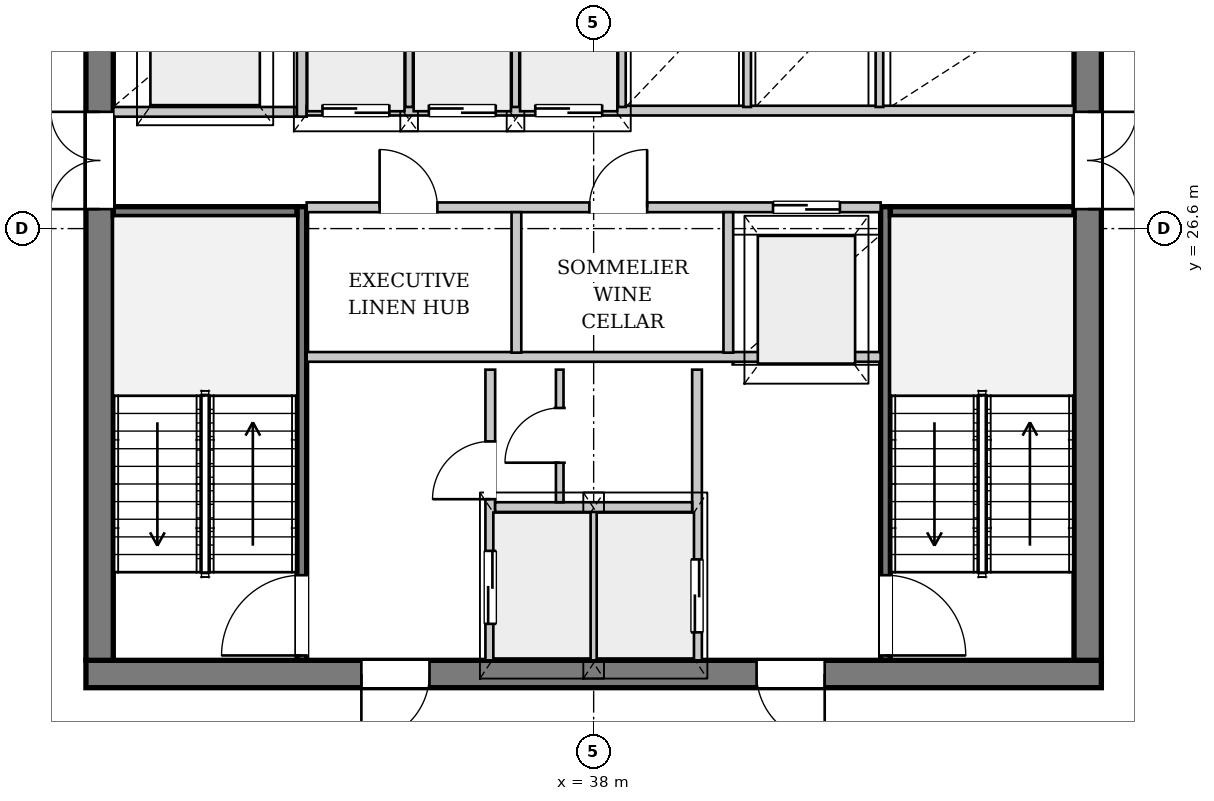
"""IFC4 building model, lengths in metres.
Left out: names, types, materials, properties, quantities, classifications, styles, units other than length and angle.
Written with IfcOpenShell. Run it as: python <this file> out.ifc"""

import sys

from ifc_helpers import new_model, si_unit, direction, frame, frame_2d, origin, place, context, subcontext, project, spatial, rectangle, extrude, source, transform, mapped, element, fill, save


model = new_model("IFC4")
c1 = context("Model", 3, precision=1e-05, world=origin(), true_north=direction((0.0, 1.0)))
c2 = subcontext(c1, "Body", "Model", "MODEL_VIEW")
j1 = project(units=[si_unit("LENGTHUNIT", "METRE"), si_unit("PLANEANGLEUNIT", "RADIAN")], contexts=[c1])
p1 = place(None, origin())
s1 = spatial("IfcSite", under=j1, at=p1, CompositionType="ELEMENT")
p2 = place(p1, origin())
s2 = spatial("IfcBuilding", under=s1, at=p2, CompositionType="ELEMENT")
p3 = place(p2, frame((0.0, 0.0, 209.6)))
s3 = spatial("IfcBuildingStorey", under=s2, at=p3, CompositionType="ELEMENT", Elevation=209.6)
p4 = place(p3, frame((52.953, 23.164, 0.0), z_axis=(0.0, 0.0, 1.0), x_axis=(-0.498307707731, -0.867000247068, 0.0)))
e1 = element("IfcWall", 1, at=p4, inside=s3, PredefinedType="SOLIDWALL", context=c2, shape_type="SweptSolid", body=[
    extrude(rectangle(XDim=23.102, YDim=0.32, at=frame_2d((11.551, 0.0))), origin(), (0.0, 0.0, 1.0), 2.822),
])
p5 = place(p4, frame((6.643, 0.0, 0.0)))
e2 = element("IfcOpeningElement", 2, at=p5, cuts=e1, PredefinedType="OPENING", context=c2, shape_type="SweptSolid", body=[
    extrude(rectangle(XDim=1.5, YDim=2.3, at=frame_2d((0.75, 1.15))), frame((0.0, 0.17, 0.0), z_axis=(0.0, -1.0, 0.0), x_axis=(1.0, 0.0, 0.0)), (0.0, 0.0, 1.0), 0.34),
])
p6 = place(p4, frame((15.796, 0.0, 0.352)))
e3 = element("IfcOpeningElement", 3, at=p6, cuts=e1, PredefinedType="OPENING", context=c2, shape_type="SweptSolid", body=[
    extrude(rectangle(XDim=2.6, YDim=2.35, at=frame_2d((1.3, 1.175))), frame((0.0, 0.17, 0.0), z_axis=(0.0, -1.0, 0.0), x_axis=(1.0, 0.0, 0.0)), (0.0, 0.0, 1.0), 0.34),
])
p7 = place(p3, frame((46.35, 19.275, 0.0), z_axis=(0.0, 0.0, 1.0), x_axis=(-1.0, 0.0, 0.0)))
e4 = element("IfcWall", 4, at=p7, inside=s3, PredefinedType="SHEAR", context=c2, shape_type="SweptSolid", body=[
    extrude(rectangle(XDim=16.7, YDim=0.45, at=frame_2d((8.35, 0.0))), origin(), (0.0, 0.0, 1.0), 3.33),
])
p8 = place(p7, frame((4.55, 0.0, 0.0)))
e5 = element("IfcOpeningElement", 5, at=p8, cuts=e4, PredefinedType="OPENING", context=c2, shape_type="SweptSolid", body=[
    extrude(rectangle(XDim=1.12, YDim=2.25, at=frame_2d((0.56, 1.125))), frame((0.0, 0.235, 0.0), z_axis=(0.0, -1.0, 0.0), x_axis=(1.0, 0.0, 0.0)), (0.0, 0.0, 1.0), 0.47),
])
p9 = place(p7, frame((11.05, 0.0, 0.0)))
e6 = element("IfcOpeningElement", 6, at=p9, cuts=e4, PredefinedType="OPENING", context=c2, shape_type="SweptSolid", body=[
    extrude(rectangle(XDim=1.12, YDim=2.25, at=frame_2d((0.56, 1.125))), frame((0.0, 0.235, 0.0), z_axis=(0.0, -1.0, 0.0), x_axis=(1.0, 0.0, 0.0)), (0.0, 0.0, 1.0), 0.47),
])
p10 = place(p3, frame((29.875, 19.5, 0.0), z_axis=(0.0, 0.0, 1.0), x_axis=(0.0, 1.0, 0.0)))
e7 = element("IfcWall", 7, at=p10, inside=s3, PredefinedType="SHEAR", context=c2, shape_type="SweptSolid", body=[
    extrude(rectangle(XDim=14.2, YDim=0.45, at=frame_2d((7.1, 0.0))), origin(), (0.0, 0.0, 1.0), 3.33),
])
p11 = place(p10, frame((7.42, 0.0, 0.0)))
e8 = element("IfcOpeningElement", 8, at=p11, cuts=e7, PredefinedType="OPENING", context=c2, shape_type="SweptSolid", body=[
    extrude(rectangle(XDim=1.6, YDim=2.2, at=frame_2d((0.8, 1.1))), frame((0.0, 0.235, 0.0), z_axis=(0.0, -1.0, 0.0), x_axis=(1.0, 0.0, 0.0)), (0.0, 0.0, 1.0), 0.47),
])
p12 = place(p3, frame((46.125, 33.7, 0.0), z_axis=(0.0, 0.0, 1.0), x_axis=(0.0, -1.0, 0.0)))
e9 = element("IfcWall", 9, at=p12, inside=s3, PredefinedType="SHEAR", context=c2, shape_type="SweptSolid", body=[
    extrude(rectangle(XDim=14.2, YDim=0.45, at=frame_2d((7.1, 0.0))), origin(), (0.0, 0.0, 1.0), 3.33),
])
p13 = place(p12, frame((5.18, 0.0, 0.0)))
e10 = element("IfcOpeningElement", 10, at=p13, cuts=e9, PredefinedType="OPENING", context=c2, shape_type="SweptSolid", body=[
    extrude(rectangle(XDim=1.6, YDim=2.2, at=frame_2d((0.8, 1.1))), frame((0.0, 0.235, 0.0), z_axis=(0.0, -1.0, 0.0), x_axis=(1.0, 0.0, 0.0)), (0.0, 0.0, 1.0), 0.47),
])
p14 = place(p12, frame((2.05, 0.0, 0.0)))
e11 = element("IfcOpeningElement", 11, at=p14, cuts=e9, PredefinedType="OPENING", context=c2, shape_type="SweptSolid", body=[
    extrude(rectangle(XDim=0.95, YDim=2.1, at=frame_2d((0.475, 1.05))), frame((0.0, 0.235, 0.0), z_axis=(0.0, -1.0, 0.0), x_axis=(1.0, 0.0, 0.0)), (0.0, 0.0, 1.0), 0.47),
])
p15 = place(p3, frame((33.2, 19.5, 0.0), z_axis=(0.0, 0.0, 1.0), x_axis=(0.0, 1.0, 0.0)))
e12 = element("IfcWall", 12, at=p15, inside=s3, PredefinedType="PARTITIONING", context=c2, shape_type="SweptSolid", body=[
    extrude(rectangle(XDim=7.46, YDim=0.16, at=frame_2d((3.73, 0.0))), origin(), (0.0, 0.0, 1.0), 3.33),
])
p16 = place(p15, frame((0.08, 0.0, 0.0)))
e13 = element("IfcOpeningElement", 13, at=p16, cuts=e12, PredefinedType="OPENING", context=c2, shape_type="SweptSolid", body=[
    extrude(rectangle(XDim=1.32, YDim=2.2, at=frame_2d((0.66, 1.1))), frame((0.0, 0.09, 0.0), z_axis=(0.0, -1.0, 0.0), x_axis=(1.0, 0.0, 0.0)), (0.0, 0.0, 1.0), 0.18),
])
p17 = place(p3, frame((30.1, 26.88, 0.0), z_axis=(0.0, 0.0, 1.0), x_axis=(1.0, 0.0, 0.0)))
e14 = element("IfcWall", 14, at=p17, inside=s3, PredefinedType="PARTITIONING", context=c2, shape_type="SweptSolid", body=[
    extrude(rectangle(XDim=3.02, YDim=0.16, at=frame_2d((1.51, 0.0))), origin(), (0.0, 0.0, 1.0), 3.33),
])
p18 = place(p3, frame((42.8, 26.96, 0.0), z_axis=(0.0, 0.0, 1.0), x_axis=(0.0, -1.0, 0.0)))
e15 = element("IfcWall", 15, at=p18, inside=s3, PredefinedType="PARTITIONING", context=c2, shape_type="SweptSolid", body=[
    extrude(rectangle(XDim=7.46, YDim=0.16, at=frame_2d((3.73, 0.0))), origin(), (0.0, 0.0, 1.0), 3.33),
])
p19 = place(p18, frame((6.06, 0.0, 0.0)))
e16 = element("IfcOpeningElement", 16, at=p19, cuts=e15, PredefinedType="OPENING", context=c2, shape_type="SweptSolid", body=[
    extrude(rectangle(XDim=1.32, YDim=2.2, at=frame_2d((0.66, 1.1))), frame((0.0, 0.09, 0.0), z_axis=(0.0, -1.0, 0.0), x_axis=(1.0, 0.0, 0.0)), (0.0, 0.0, 1.0), 0.18),
])
p20 = place(p3, frame((42.88, 26.88, 0.0), z_axis=(0.0, 0.0, 1.0), x_axis=(1.0, 0.0, 0.0)))
e17 = element("IfcWall", 17, at=p20, inside=s3, PredefinedType="PARTITIONING", context=c2, shape_type="SweptSolid", body=[
    extrude(rectangle(XDim=3.02, YDim=0.16, at=frame_2d((1.51, 0.0))), origin(), (0.0, 0.0, 1.0), 3.33),
])
p21 = place(p3, frame((36.3, 19.5, 0.0), z_axis=(0.0, 0.0, 1.0), x_axis=(0.0, 1.0, 0.0)))
e18 = element("IfcWall", 18, at=p21, inside=s3, PredefinedType="PARTITIONING", context=c2, shape_type="SweptSolid", body=[
    extrude(rectangle(XDim=4.78, YDim=0.16, at=frame_2d((2.39, 0.0))), origin(), (0.0, 0.0, 1.0), 3.33),
])
p22 = place(p21, frame((0.6, 0.0, 0.0)))
e19 = element("IfcOpeningElement", 19, at=p22, cuts=e18, PredefinedType="OPENING", context=c2, shape_type="SweptSolid", body=[
    extrude(rectangle(XDim=1.2, YDim=2.2, at=frame_2d((0.6, 1.1))), frame((0.0, 0.09, 0.0), z_axis=(0.0, -1.0, 0.0), x_axis=(1.0, 0.0, 0.0)), (0.0, 0.0, 1.0), 0.18),
])
p23 = place(p21, frame((2.65, 0.0, 0.0)))
e20 = element("IfcOpeningElement", 20, at=p23, cuts=e18, PredefinedType="OPENING", context=c2, shape_type="SweptSolid", body=[
    extrude(rectangle(XDim=0.95, YDim=2.1, at=frame_2d((0.475, 1.05))), frame((0.0, 0.09, 0.0), z_axis=(0.0, -1.0, 0.0), x_axis=(1.0, 0.0, 0.0)), (0.0, 0.0, 1.0), 0.18),
])
p24 = place(p3, frame((39.7, 24.28, 0.0), z_axis=(0.0, 0.0, 1.0), x_axis=(0.0, -1.0, 0.0)))
e21 = element("IfcWall", 21, at=p24, inside=s3, PredefinedType="PARTITIONING", context=c2, shape_type="SweptSolid", body=[
    extrude(rectangle(XDim=4.78, YDim=0.16, at=frame_2d((2.39, 0.0))), origin(), (0.0, 0.0, 1.0), 3.33),
])
p25 = place(p24, frame((3.12, 0.0, 0.0)))
e22 = element("IfcOpeningElement", 22, at=p25, cuts=e21, PredefinedType="OPENING", context=c2, shape_type="SweptSolid", body=[
    extrude(rectangle(XDim=1.2, YDim=2.2, at=frame_2d((0.6, 1.1))), frame((0.0, 0.09, 0.0), z_axis=(0.0, -1.0, 0.0), x_axis=(1.0, 0.0, 0.0)), (0.0, 0.0, 1.0), 0.18),
])
p26 = place(p3, frame((38.0, 19.5, 0.0), z_axis=(0.0, 0.0, 1.0), x_axis=(0.0, 1.0, 0.0)))
e23 = element("IfcWall", 23, at=p26, inside=s3, PredefinedType="PARTITIONING", context=c2, shape_type="SweptSolid", body=[
    extrude(rectangle(XDim=2.46, YDim=0.125, at=frame_2d((1.23, 0.0))), origin(), (0.0, 0.0, 1.0), 3.33),
])
p27 = place(p3, frame((36.38, 22.02, 0.0), z_axis=(0.0, 0.0, 1.0), x_axis=(1.0, 0.0, 0.0)))
e24 = element("IfcWall", 24, at=p27, inside=s3, PredefinedType="PARTITIONING", context=c2, shape_type="SweptSolid", body=[
    extrude(rectangle(XDim=3.24, YDim=0.16, at=frame_2d((1.62, 0.0))), origin(), (0.0, 0.0, 1.0), 3.33),
])
p28 = place(p3, frame((33.28, 24.49, 0.0), z_axis=(0.0, 0.0, 1.0), x_axis=(1.0, 0.0, 0.0)))
e25 = element("IfcWall", 25, at=p28, inside=s3, PredefinedType="PARTITIONING", context=c2, shape_type="SweptSolid", body=[
    extrude(rectangle(XDim=9.44, YDim=0.16, at=frame_2d((4.72, 0.0))), origin(), (0.0, 0.0, 1.0), 3.33),
])
p29 = place(p3, frame((37.442, 22.1, 0.0), z_axis=(0.0, 0.0, 1.0), x_axis=(0.0, 1.0, 0.0)))
e26 = element("IfcWall", 26, at=p29, inside=s3, PredefinedType="PARTITIONING", context=c2, shape_type="SweptSolid", body=[
    extrude(rectangle(XDim=2.18, YDim=0.125, at=frame_2d((1.09, 0.0))), origin(), (0.0, 0.0, 1.0), 3.33),
])
p30 = place(p29, frame((0.65, 0.0, 0.0)))
e27 = element("IfcOpeningElement", 27, at=p30, cuts=e26, PredefinedType="OPENING", context=c2, shape_type="SweptSolid", body=[
    extrude(rectangle(XDim=0.9, YDim=2.1, at=frame_2d((0.45, 1.05))), frame((0.0, 0.073, 0.0), z_axis=(0.0, -1.0, 0.0), x_axis=(1.0, 0.0, 0.0)), (0.0, 0.0, 1.0), 0.145),
])
p31 = place(p3, frame((30.1, 28.52, 0.0), z_axis=(0.0, 0.0, 1.0), x_axis=(1.0, 0.0, 0.0)))
e28 = element("IfcWall", 28, at=p31, inside=s3, PredefinedType="PARTITIONING", context=c2, shape_type="SweptSolid", body=[
    extrude(rectangle(XDim=3.02, YDim=0.16, at=frame_2d((1.51, 0.0))), origin(), (0.0, 0.0, 1.0), 3.33),
])
p32 = place(p3, frame((33.2, 28.44, 0.0), z_axis=(0.0, 0.0, 1.0), x_axis=(0.0, 1.0, 0.0)))
e29 = element("IfcWall", 29, at=p32, inside=s3, PredefinedType="PARTITIONING", context=c2, shape_type="SweptSolid", body=[
    extrude(rectangle(XDim=5.26, YDim=0.16, at=frame_2d((2.63, 0.0))), origin(), (0.0, 0.0, 1.0), 3.33),
])
p33 = place(p3, frame((33.28, 26.95, 0.0), z_axis=(0.0, 0.0, 1.0), x_axis=(1.0, 0.0, 0.0)))
e30 = element("IfcWall", 30, at=p33, inside=s3, PredefinedType="PARTITIONING", context=c2, shape_type="SweptSolid", body=[
    extrude(rectangle(XDim=9.44, YDim=0.16, at=frame_2d((4.72, 0.0))), origin(), (0.0, 0.0, 1.0), 3.33),
])
p34 = place(p33, frame((1.2, 0.0, 0.0)))
e31 = element("IfcOpeningElement", 31, at=p34, cuts=e30, PredefinedType="OPENING", context=c2, shape_type="SweptSolid", body=[
    extrude(rectangle(XDim=0.95, YDim=2.1, at=frame_2d((0.475, 1.05))), frame((0.0, 0.09, 0.0), z_axis=(0.0, -1.0, 0.0), x_axis=(1.0, 0.0, 0.0)), (0.0, 0.0, 1.0), 0.18),
])
p35 = place(p33, frame((4.65, 0.0, 0.0)))
e32 = element("IfcOpeningElement", 32, at=p35, cuts=e30, PredefinedType="OPENING", context=c2, shape_type="SweptSolid", body=[
    extrude(rectangle(XDim=0.95, YDim=2.1, at=frame_2d((0.475, 1.05))), frame((0.0, 0.09, 0.0), z_axis=(0.0, -1.0, 0.0), x_axis=(1.0, 0.0, 0.0)), (0.0, 0.0, 1.0), 0.18),
])
p36 = place(p33, frame((7.67, 0.0, 0.0)))
e33 = element("IfcOpeningElement", 33, at=p36, cuts=e30, PredefinedType="OPENING", context=c2, shape_type="SweptSolid", body=[
    extrude(rectangle(XDim=1.1, YDim=2.2, at=frame_2d((0.55, 1.1))), frame((0.0, 0.09, 0.0), z_axis=(0.0, -1.0, 0.0), x_axis=(1.0, 0.0, 0.0)), (0.0, 0.0, 1.0), 0.18),
])
for number, where, z_axis, x_axis in (
    (34, (36.73, 24.56, 0.0), (0.0, 0.0, 1.0), (0.0, 1.0, 0.0)),
    (35, (40.215, 24.56, 0.0), (0.0, 0.0, 1.0), (0.0, 1.0, 0.0)),
):
    element("IfcWall", number, at=place(p3, frame(where, z_axis=z_axis, x_axis=x_axis)), inside=s3, PredefinedType="PARTITIONING", context=c2, shape_type="SweptSolid", body=[
        extrude(rectangle(XDim=2.31, YDim=0.16, at=frame_2d((1.155, 0.0))), origin(), (0.0, 0.0, 1.0), 3.33),
    ])
p37 = place(p3, frame((33.28, 28.54, 0.0), z_axis=(0.0, 0.0, 1.0), x_axis=(1.0, 0.0, 0.0)))
e36 = element("IfcWall", 36, at=p37, inside=s3, PredefinedType="PARTITIONING", context=c2, shape_type="SweptSolid", body=[
    extrude(rectangle(XDim=12.62, YDim=0.16, at=frame_2d((6.31, 0.0))), origin(), (0.0, 0.0, 1.0), 3.33),
])
p38 = place(p37, frame((0.26, 0.0, 0.0)))
e37 = element("IfcOpeningElement", 37, at=p38, cuts=e36, PredefinedType="OPENING", context=c2, shape_type="SweptSolid", body=[
    extrude(rectangle(XDim=1.1, YDim=2.2, at=frame_2d((0.55, 1.1))), frame((0.0, 0.09, 0.0), z_axis=(0.0, -1.0, 0.0), x_axis=(1.0, 0.0, 0.0)), (0.0, 0.0, 1.0), 0.18),
])
p39 = place(p37, frame((2.01, 0.0, 0.0)))
e38 = element("IfcOpeningElement", 38, at=p39, cuts=e36, PredefinedType="OPENING", context=c2, shape_type="SweptSolid", body=[
    extrude(rectangle(XDim=1.1, YDim=2.2, at=frame_2d((0.55, 1.1))), frame((0.0, 0.09, 0.0), z_axis=(0.0, -1.0, 0.0), x_axis=(1.0, 0.0, 0.0)), (0.0, 0.0, 1.0), 0.18),
])
p40 = place(p37, frame((3.76, 0.0, 0.0)))
e39 = element("IfcOpeningElement", 39, at=p40, cuts=e36, PredefinedType="OPENING", context=c2, shape_type="SweptSolid", body=[
    extrude(rectangle(XDim=1.1, YDim=2.2, at=frame_2d((0.55, 1.1))), frame((0.0, 0.09, 0.0), z_axis=(0.0, -1.0, 0.0), x_axis=(1.0, 0.0, 0.0)), (0.0, 0.0, 1.0), 0.18),
])
for number, where, z_axis, x_axis in (
    (40, (34.965, 28.6, 0.0), (0.0, 0.0, 1.0), (0.0, 1.0, 0.0)),
    (41, (36.715, 28.6, 0.0), (0.0, 0.0, 1.0), (0.0, 1.0, 0.0)),
    (42, (38.465, 28.6, 0.0), (0.0, 0.0, 1.0), (0.0, 1.0, 0.0)),
    (43, (40.525, 28.6, 0.0), (0.0, 0.0, 1.0), (0.0, 1.0, 0.0)),
    (44, (42.7, 28.6, 0.0), (0.0, 0.0, 1.0), (0.0, 1.0, 0.0)),
):
    element("IfcWall", number, at=place(p3, frame(where, z_axis=z_axis, x_axis=x_axis)), inside=s3, PredefinedType="PARTITIONING", context=c2, shape_type="SweptSolid", body=[
        extrude(rectangle(XDim=1.92, YDim=0.125, at=frame_2d((0.96, 0.0))), origin(), (0.0, 0.0, 1.0), 3.33),
    ])
m1 = source(origin(), c2, "Body", "SweptSolid", [
    extrude(rectangle(XDim=1.12, YDim=2.25, at=frame_2d((0.56, 1.125))), frame((0.0, 0.025, 0.0), z_axis=(0.0, -1.0, 0.0), x_axis=(1.0, 0.0, 0.0)), (0.0, 0.0, 1.0), 0.05),
])
p41 = place(p8, origin())
e45 = element("IfcDoor", 45, at=p41, inside=s3, OperationType="SINGLE_SWING_LEFT", PredefinedType="DOOR", context=c2, shape_type="MappedRepresentation", body=[
    mapped(m1, transform((0.0, 0.0, 0.0), x_axis=(1.0, 0.0, 0.0), y_axis=(0.0, 1.0, 0.0), z_axis=(0.0, 0.0, 1.0), scale=1.0)),
])
fill(e5, e45)
p42 = place(p9, origin())
e46 = element("IfcDoor", 46, at=p42, inside=s3, OperationType="SINGLE_SWING_RIGHT", PredefinedType="DOOR", context=c2, shape_type="MappedRepresentation", body=[
    mapped(m1, transform((0.0, 0.0, 0.0), x_axis=(1.0, 0.0, 0.0), y_axis=(0.0, 1.0, 0.0), z_axis=(0.0, 0.0, 1.0), scale=1.0)),
])
fill(e6, e46)
m2 = source(origin(), c2, "Body", "SweptSolid", [
    extrude(rectangle(XDim=1.6, YDim=2.2, at=frame_2d((0.8, 1.1))), frame((0.0, 0.025, 0.0), z_axis=(0.0, -1.0, 0.0), x_axis=(1.0, 0.0, 0.0)), (0.0, 0.0, 1.0), 0.05),
])
p43 = place(p11, origin())
e47 = element("IfcDoor", 47, at=p43, inside=s3, OperationType="DOUBLE_DOOR_SINGLE_SWING", PredefinedType="DOOR", context=c2, shape_type="MappedRepresentation", body=[
    mapped(m2, transform((0.0, 0.0, 0.0), x_axis=(1.0, 0.0, 0.0), y_axis=(0.0, 1.0, 0.0), z_axis=(0.0, 0.0, 1.0), scale=1.0)),
])
fill(e8, e47)
p44 = place(p13, origin())
e48 = element("IfcDoor", 48, at=p44, inside=s3, OperationType="DOUBLE_DOOR_SINGLE_SWING", PredefinedType="DOOR", context=c2, shape_type="MappedRepresentation", body=[
    mapped(m2, transform((0.0, 0.0, 0.0), x_axis=(1.0, 0.0, 0.0), y_axis=(0.0, 1.0, 0.0), z_axis=(0.0, 0.0, 1.0), scale=1.0)),
])
fill(e10, e48)
m3 = source(origin(), c2, "Body", "SweptSolid", [
    extrude(rectangle(XDim=1.32, YDim=2.2, at=frame_2d((0.66, 1.1))), frame((0.0, 0.025, 0.0), z_axis=(0.0, -1.0, 0.0), x_axis=(1.0, 0.0, 0.0)), (0.0, 0.0, 1.0), 0.05),
])
p45 = place(p16, origin())
e49 = element("IfcDoor", 49, at=p45, inside=s3, OperationType="SINGLE_SWING_LEFT", PredefinedType="DOOR", context=c2, shape_type="MappedRepresentation", body=[
    mapped(m3, transform((0.0, 0.0, 0.0), x_axis=(1.0, 0.0, 0.0), y_axis=(0.0, 1.0, 0.0), z_axis=(0.0, 0.0, 1.0), scale=1.0)),
])
fill(e13, e49)
p46 = place(p19, origin())
e50 = element("IfcDoor", 50, at=p46, inside=s3, OperationType="SINGLE_SWING_RIGHT", PredefinedType="DOOR", context=c2, shape_type="MappedRepresentation", body=[
    mapped(m3, transform((0.0, 0.0, 0.0), x_axis=(1.0, 0.0, 0.0), y_axis=(0.0, 1.0, 0.0), z_axis=(0.0, 0.0, 1.0), scale=1.0)),
])
fill(e16, e50)
m4 = source(origin(), c2, "Body", "SweptSolid", [
    extrude(rectangle(XDim=1.2, YDim=2.2, at=frame_2d((0.6, 1.1))), frame((0.0, 0.025, 0.0), z_axis=(0.0, -1.0, 0.0), x_axis=(1.0, 0.0, 0.0)), (0.0, 0.0, 1.0), 0.05),
])
p47 = place(p22, origin())
e51 = element("IfcDoor", 51, at=p47, inside=s3, OperationType="DOUBLE_DOOR_SLIDING", PredefinedType="DOOR", context=c2, shape_type="MappedRepresentation", body=[
    mapped(m4, transform((0.0, 0.0, 0.0), x_axis=(1.0, 0.0, 0.0), y_axis=(0.0, 1.0, 0.0), z_axis=(0.0, 0.0, 1.0), scale=1.0)),
])
fill(e19, e51)
m5 = source(origin(), c2, "Body", "SweptSolid", [
    extrude(rectangle(XDim=0.95, YDim=2.1, at=frame_2d((0.475, 1.05))), frame((0.0, 0.025, 0.0), z_axis=(0.0, -1.0, 0.0), x_axis=(1.0, 0.0, 0.0)), (0.0, 0.0, 1.0), 0.05),
])
p48 = place(p23, origin())
e52 = element("IfcDoor", 52, at=p48, inside=s3, OperationType="SINGLE_SWING_LEFT", PredefinedType="DOOR", context=c2, shape_type="MappedRepresentation", body=[
    mapped(m5, transform((0.0, 0.0, 0.0), x_axis=(1.0, 0.0, 0.0), y_axis=(0.0, 1.0, 0.0), z_axis=(0.0, 0.0, 1.0), scale=1.0)),
])
fill(e20, e52)
m6 = source(origin(), c2, "Body", "SweptSolid", [
    extrude(rectangle(XDim=0.9, YDim=2.1, at=frame_2d((0.45, 1.05))), frame((0.0, 0.025, 0.0), z_axis=(0.0, -1.0, 0.0), x_axis=(1.0, 0.0, 0.0)), (0.0, 0.0, 1.0), 0.05),
])
p49 = place(p30, origin())
e53 = element("IfcDoor", 53, at=p49, inside=s3, OperationType="SINGLE_SWING_LEFT", PredefinedType="DOOR", context=c2, shape_type="MappedRepresentation", body=[
    mapped(m6, transform((0.0, 0.0, 0.0), x_axis=(1.0, 0.0, 0.0), y_axis=(0.0, 1.0, 0.0), z_axis=(0.0, 0.0, 1.0), scale=1.0)),
])
fill(e27, e53)
p50 = place(p25, origin())
e54 = element("IfcDoor", 54, at=p50, inside=s3, OperationType="DOUBLE_DOOR_SLIDING", PredefinedType="DOOR", context=c2, shape_type="MappedRepresentation", body=[
    mapped(m4, transform((0.0, 0.0, 0.0), x_axis=(1.0, 0.0, 0.0), y_axis=(0.0, 1.0, 0.0), z_axis=(0.0, 0.0, 1.0), scale=1.0)),
])
fill(e22, e54)
p51 = place(p34, origin())
e55 = element("IfcDoor", 55, at=p51, inside=s3, OperationType="SINGLE_SWING_LEFT", PredefinedType="DOOR", context=c2, shape_type="MappedRepresentation", body=[
    mapped(m5, transform((0.0, 0.0, 0.0), x_axis=(1.0, 0.0, 0.0), y_axis=(0.0, 1.0, 0.0), z_axis=(0.0, 0.0, 1.0), scale=1.0)),
])
fill(e31, e55)
p52 = place(p35, origin())
e56 = element("IfcDoor", 56, at=p52, inside=s3, OperationType="SINGLE_SWING_RIGHT", PredefinedType="DOOR", context=c2, shape_type="MappedRepresentation", body=[
    mapped(m5, transform((0.0, 0.0, 0.0), x_axis=(1.0, 0.0, 0.0), y_axis=(0.0, 1.0, 0.0), z_axis=(0.0, 0.0, 1.0), scale=1.0)),
])
fill(e32, e56)
m7 = source(origin(), c2, "Body", "SweptSolid", [
    extrude(rectangle(XDim=1.1, YDim=2.2, at=frame_2d((0.55, 1.1))), frame((0.0, 0.025, 0.0), z_axis=(0.0, -1.0, 0.0), x_axis=(1.0, 0.0, 0.0)), (0.0, 0.0, 1.0), 0.05),
])
p53 = place(p36, origin())
e57 = element("IfcDoor", 57, at=p53, inside=s3, OperationType="DOUBLE_DOOR_SLIDING", PredefinedType="DOOR", context=c2, shape_type="MappedRepresentation", body=[
    mapped(m7, transform((0.0, 0.0, 0.0), x_axis=(1.0, 0.0, 0.0), y_axis=(0.0, 1.0, 0.0), z_axis=(0.0, 0.0, 1.0), scale=1.0)),
])
fill(e33, e57)
p54 = place(p38, origin())
e58 = element("IfcDoor", 58, at=p54, inside=s3, OperationType="DOUBLE_DOOR_SLIDING", PredefinedType="DOOR", context=c2, shape_type="MappedRepresentation", body=[
    mapped(m7, transform((0.0, 0.0, 0.0), x_axis=(1.0, 0.0, 0.0), y_axis=(0.0, 1.0, 0.0), z_axis=(0.0, 0.0, 1.0), scale=1.0)),
])
fill(e37, e58)
p55 = place(p39, origin())
e59 = element("IfcDoor", 59, at=p55, inside=s3, OperationType="DOUBLE_DOOR_SLIDING", PredefinedType="DOOR", context=c2, shape_type="MappedRepresentation", body=[
    mapped(m7, transform((0.0, 0.0, 0.0), x_axis=(1.0, 0.0, 0.0), y_axis=(0.0, 1.0, 0.0), z_axis=(0.0, 0.0, 1.0), scale=1.0)),
])
fill(e38, e59)
p56 = place(p40, origin())
e60 = element("IfcDoor", 60, at=p56, inside=s3, OperationType="DOUBLE_DOOR_SLIDING", PredefinedType="DOOR", context=c2, shape_type="MappedRepresentation", body=[
    mapped(m7, transform((0.0, 0.0, 0.0), x_axis=(1.0, 0.0, 0.0), y_axis=(0.0, 1.0, 0.0), z_axis=(0.0, 0.0, 1.0), scale=1.0)),
])
fill(e39, e60)
save(model, sys.argv[1])
